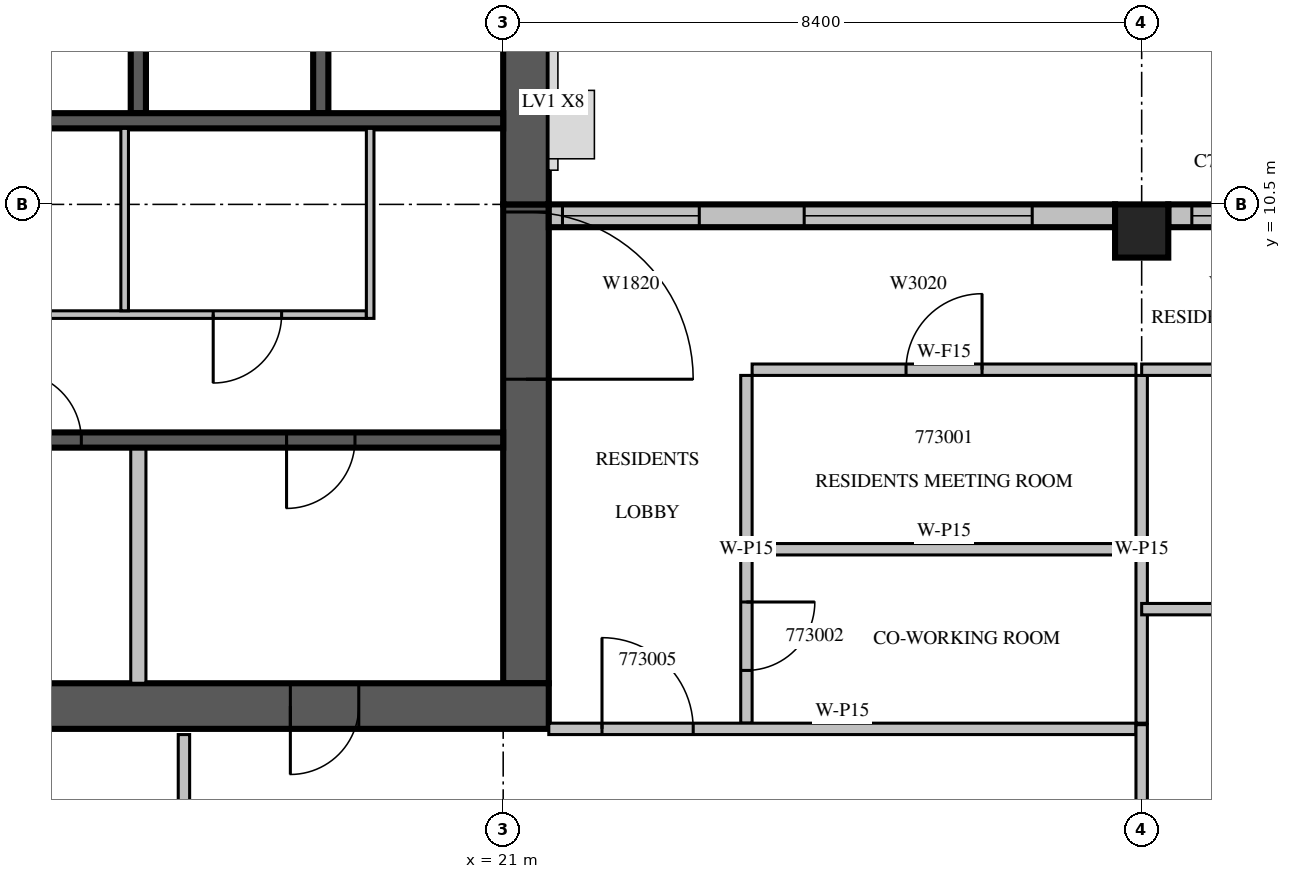
"""IFC4 building model, lengths in metres.
Left out: names, types, materials, properties, quantities, classifications, styles, units other than length and angle.
Written with IfcOpenShell. Run it as: python <this file> out.ifc"""

import sys

from ifc_helpers import new_model, si_unit, direction, frame, frame_2d, origin, origin_2d, place, context, subcontext, project, spatial, rectangle, extrude, source, transform, mapped, element, fill, save


model = new_model("IFC4")
c1 = context("Model", 3, precision=1e-05, world=origin(), true_north=direction((0.0, 1.0)))
c2 = subcontext(c1, "Body", "Model", "MODEL_VIEW")
j1 = project(units=[si_unit("LENGTHUNIT", "METRE"), si_unit("PLANEANGLEUNIT", "RADIAN")], contexts=[c1])
p1 = place(None, origin())
s1 = spatial("IfcSite", under=j1, at=p1, CompositionType="ELEMENT")
p2 = place(p1, origin())
s2 = spatial("IfcBuilding", under=s1, at=p2, CompositionType="ELEMENT")
p3 = place(p2, frame((0.0, 0.0, 316.0)))
s3 = spatial("IfcBuildingStorey", under=s2, at=p3, CompositionType="ELEMENT", Elevation=316.0)
m1 = source(origin(), c2, "Body", "SweptSolid", [
    extrude(rectangle(XDim=0.7, YDim=0.7, at=origin_2d()), origin(), (0.0, 0.0, 1.0), 3.5),
])
p4 = place(p3, frame((29.4, 10.15, 0.0), z_axis=(0.0, 0.0, 1.0), x_axis=(1.0, 0.0, 0.0)))
e1 = element("IfcColumn", 1, at=p4, inside=s3, PredefinedType="COLUMN", context=c2, shape_type="MappedRepresentation", body=[
    mapped(m1, transform((0.0, 0.0, 0.0), scale=1.0)),
])
m2 = source(origin(), c2, "Body", "SweptSolid", [
    extrude(rectangle(XDim=6.3, YDim=0.6, at=frame_2d((3.15, 0.0))), origin(), (0.0, 0.0, 1.0), 3.5),
])
p5 = place(p3, frame((21.3, 4.2, 0.0), z_axis=(0.0, 0.0, 1.0), x_axis=(0.0, 1.0, 0.0)))
e2 = element("IfcWall", 2, at=p5, inside=s3, PredefinedType="SHEAR", context=c2, shape_type="MappedRepresentation", body=[
    mapped(m2, transform((0.0, 0.0, 0.0), scale=1.0)),
])
m3 = source(origin(), c2, "Body", "SweptSolid", [
    extrude(rectangle(XDim=2.2, YDim=2.1, at=frame_2d((1.1, 1.05))), frame((0.0, 0.31, 0.0), z_axis=(0.0, -1.0, 0.0), x_axis=(1.0, 0.0, 0.0)), (0.0, 0.0, 1.0), 0.62),
])
p6 = place(p5, frame((4.0, 0.0, 0.0)))
e3 = element("IfcOpeningElement", 3, at=p6, cuts=e2, PredefinedType="OPENING", context=c2, shape_type="MappedRepresentation", body=[
    mapped(m3, transform((0.0, 0.0, 0.0), scale=1.0)),
])
m4 = source(origin(), c2, "Body", "SweptSolid", [
    extrude(rectangle(XDim=17.4, YDim=0.6, at=frame_2d((8.7, 0.0))), origin(), (0.0, 0.0, 1.0), 3.5),
])
p7 = place(p3, frame((4.2, 3.9, 0.0), z_axis=(0.0, 0.0, 1.0), x_axis=(1.0, 0.0, 0.0)))
e4 = element("IfcWall", 4, at=p7, inside=s3, PredefinedType="SHEAR", context=c2, shape_type="MappedRepresentation", body=[
    mapped(m4, transform((0.0, 0.0, 0.0), scale=1.0)),
])
m5 = source(origin(), c2, "Body", "SweptSolid", [
    extrude(rectangle(XDim=0.9, YDim=2.1, at=frame_2d((0.45, 1.05))), frame((0.0, 0.31, 0.0), z_axis=(0.0, -1.0, 0.0), x_axis=(1.0, 0.0, 0.0)), (0.0, 0.0, 1.0), 0.62),
])
p8 = place(p7, frame((14.0, 0.0, 0.0)))
e5 = element("IfcOpeningElement", 5, at=p8, cuts=e4, PredefinedType="OPENING", context=c2, shape_type="MappedRepresentation", body=[
    mapped(m5, transform((0.0, 0.0, 0.0), scale=1.0)),
])
m6 = source(origin(), c2, "Body", "SweptSolid", [
    extrude(rectangle(XDim=10.5, YDim=0.6, at=frame_2d((5.25, 0.0))), origin(), (0.0, 0.0, 1.0), 3.5),
])
p9 = place(p3, frame((21.3, 10.5, 0.0), z_axis=(0.0, 0.0, 1.0), x_axis=(0.0, 1.0, 0.0)))
e6 = element("IfcWall", 6, at=p9, inside=s3, PredefinedType="SHEAR", context=c2, shape_type="MappedRepresentation", body=[
    mapped(m6, transform((0.0, 0.0, 0.0), scale=1.0)),
])
m7 = source(origin(), c2, "Body", "SweptSolid", [
    extrude(rectangle(XDim=1.2, YDim=2.4, at=frame_2d((0.6, 1.2))), frame((0.0, 0.31, 0.0), z_axis=(0.0, -1.0, 0.0), x_axis=(1.0, 0.0, 0.0)), (0.0, 0.0, 1.0), 0.62),
])
p10 = place(p9, frame((5.7, 0.0, 0.6)))
e7 = element("IfcOpeningElement", 7, at=p10, cuts=e6, PredefinedType="OPENING", context=c2, shape_type="MappedRepresentation", body=[
    mapped(m7, transform((0.0, 0.0, 0.0), scale=1.0)),
])
m8 = source(origin(), c2, "Body", "SweptSolid", [
    extrude(rectangle(XDim=7.7, YDim=0.3, at=frame_2d((3.85, 0.0))), origin(), (0.0, 0.0, 1.0), 3.1),
])
p11 = place(p3, frame((37.45, 10.35, 0.0), z_axis=(0.0, 0.0, 1.0), x_axis=(-1.0, 0.0, 0.0)))
e8 = element("IfcWall", 8, at=p11, inside=s3, PredefinedType="STANDARD", context=c2, shape_type="MappedRepresentation", body=[
    mapped(m8, transform((0.0, 0.0, 0.0), scale=1.0)),
])
m9 = source(origin(), c2, "Body", "SweptSolid", [
    extrude(rectangle(XDim=3.0, YDim=2.0, at=frame_2d((1.5, 1.0))), frame((0.0, 0.16, 0.0), z_axis=(0.0, -1.0, 0.0), x_axis=(1.0, 0.0, 0.0)), (0.0, 0.0, 1.0), 0.32),
])
p12 = place(p11, frame((1.09, 0.0, 0.6)))
e9 = element("IfcOpeningElement", 9, at=p12, cuts=e8, PredefinedType="OPENING", context=c2, shape_type="MappedRepresentation", body=[
    mapped(m9, transform((0.0, 0.0, 0.0), scale=1.0)),
])
m10 = source(origin(), c2, "Body", "SweptSolid", [
    extrude(rectangle(XDim=1.2, YDim=2.0, at=frame_2d((0.6, 1.0))), frame((0.0, 0.16, 0.0), z_axis=(0.0, -1.0, 0.0), x_axis=(1.0, 0.0, 0.0)), (0.0, 0.0, 1.0), 0.32),
])
p13 = place(p11, frame((6.19, 0.0, 0.6)))
e10 = element("IfcOpeningElement", 10, at=p13, cuts=e8, PredefinedType="OPENING", context=c2, shape_type="MappedRepresentation", body=[
    mapped(m10, transform((0.0, 0.0, 0.0), scale=1.0)),
])
m11 = source(origin(), c2, "Body", "SweptSolid", [
    extrude(rectangle(XDim=7.45, YDim=0.3, at=frame_2d((3.725, 0.0))), origin(), (0.0, 0.0, 1.0), 3.1),
])
p14 = place(p3, frame((29.05, 10.35, 0.0), z_axis=(0.0, 0.0, 1.0), x_axis=(-1.0, 0.0, 0.0)))
e11 = element("IfcWall", 11, at=p14, inside=s3, PredefinedType="STANDARD", context=c2, shape_type="MappedRepresentation", body=[
    mapped(m11, transform((0.0, 0.0, 0.0), scale=1.0)),
])
p15 = place(p14, frame((1.09, 0.0, 0.6)))
e12 = element("IfcOpeningElement", 12, at=p15, cuts=e11, PredefinedType="OPENING", context=c2, shape_type="MappedRepresentation", body=[
    mapped(m9, transform((0.0, 0.0, 0.0), scale=1.0)),
])
m12 = source(origin(), c2, "Body", "SweptSolid", [
    extrude(rectangle(XDim=1.8, YDim=2.0, at=frame_2d((0.9, 1.0))), frame((0.0, 0.16, 0.0), z_axis=(0.0, -1.0, 0.0), x_axis=(1.0, 0.0, 0.0)), (0.0, 0.0, 1.0), 0.32),
])
p16 = place(p14, frame((5.47, 0.0, 0.6)))
e13 = element("IfcOpeningElement", 13, at=p16, cuts=e11, PredefinedType="OPENING", context=c2, shape_type="MappedRepresentation", body=[
    mapped(m12, transform((0.0, 0.0, 0.0), scale=1.0)),
])
m13 = source(origin(), c2, "Body", "SweptSolid", [
    extrude(rectangle(XDim=3.1, YDim=0.2, at=frame_2d((1.55, 0.0))), origin(), (0.0, 0.0, 1.0), 3.1),
])
p17 = place(p3, frame((16.2, 4.2, 0.0), z_axis=(0.0, 0.0, 1.0), x_axis=(0.0, 1.0, 0.0)))
e14 = element("IfcWall", 14, at=p17, inside=s3, PredefinedType="PARTITIONING", context=c2, shape_type="MappedRepresentation", body=[
    mapped(m13, transform((0.0, 0.0, 0.0), scale=1.0)),
])
m14 = source(origin(), c2, "Body", "SweptSolid", [
    extrude(rectangle(XDim=3.0, YDim=0.2, at=frame_2d((1.5, 0.0))), origin(), (0.0, 0.0, 1.0), 3.5),
])
for number, where, z_axis, x_axis in (
    (15, (16.2, 11.7, 0.0), (0.0, 0.0, 1.0), (0.0, 1.0, 0.0)),
    (16, (18.6, 11.7, 0.0), (0.0, 0.0, 1.0), (0.0, 1.0, 0.0)),
):
    element("IfcWall", number, at=place(p3, frame(where, z_axis=z_axis, x_axis=x_axis)), inside=s3, PredefinedType="SOLIDWALL", context=c2, shape_type="MappedRepresentation", body=[
        mapped(m14, transform((0.0, 0.0, 0.0), scale=1.0)),
    ])
m15 = source(origin(), c2, "Body", "SweptSolid", [
    extrude(rectangle(XDim=7.2, YDim=0.2, at=frame_2d((3.6, 0.0))), origin(), (0.0, 0.0, 1.0), 3.1),
])
p18 = place(p3, frame((13.8, 7.4, 0.0), z_axis=(0.0, 0.0, 1.0), x_axis=(1.0, 0.0, 0.0)))
e17 = element("IfcWall", 17, at=p18, inside=s3, PredefinedType="SOLIDWALL", context=c2, shape_type="MappedRepresentation", body=[
    mapped(m15, transform((0.0, 0.0, 0.0), scale=1.0)),
])
m16 = source(origin(), c2, "Body", "SweptSolid", [
    extrude(rectangle(XDim=0.9, YDim=2.1, at=frame_2d((0.45, 1.05))), frame((0.0, 0.11, 0.0), z_axis=(0.0, -1.0, 0.0), x_axis=(1.0, 0.0, 0.0)), (0.0, 0.0, 1.0), 0.22),
])
p19 = place(p18, frame((0.75, 0.0, 0.0)))
e18 = element("IfcOpeningElement", 18, at=p19, cuts=e17, PredefinedType="OPENING", context=c2, shape_type="MappedRepresentation", body=[
    mapped(m16, transform((0.0, 0.0, 0.0), scale=1.0)),
])
p20 = place(p18, frame((4.35, 0.0, 0.0)))
e19 = element("IfcOpeningElement", 19, at=p20, cuts=e17, PredefinedType="OPENING", context=c2, shape_type="MappedRepresentation", body=[
    mapped(m16, transform((0.0, 0.0, 0.0), scale=1.0)),
])
m17 = source(origin(), c2, "Body", "SweptSolid", [
    extrude(rectangle(XDim=7.2, YDim=0.2, at=frame_2d((3.6, 0.0))), origin(), (0.0, 0.0, 1.0), 3.5),
])
p21 = place(p3, frame((13.8, 11.6, 0.0), z_axis=(0.0, 0.0, 1.0), x_axis=(1.0, 0.0, 0.0)))
e20 = element("IfcWall", 20, at=p21, inside=s3, PredefinedType="SOLIDWALL", context=c2, shape_type="MappedRepresentation", body=[
    mapped(m17, transform((0.0, 0.0, 0.0), scale=1.0)),
])
m18 = source(origin(), c2, "Body", "SweptSolid", [
    extrude(rectangle(XDim=5.4, YDim=0.1, at=frame_2d((2.7, 0.0))), origin(), (0.0, 0.0, 1.0), 3.1),
])
p22 = place(p3, frame((13.8, 9.05, 0.0), z_axis=(0.0, 0.0, 1.0), x_axis=(1.0, 0.0, 0.0)))
e21 = element("IfcWall", 21, at=p22, inside=s3, PredefinedType="PARTITIONING", context=c2, shape_type="MappedRepresentation", body=[
    mapped(m18, transform((0.0, 0.0, 0.0), scale=1.0)),
])
m19 = source(origin(), c2, "Body", "SweptSolid", [
    extrude(rectangle(XDim=0.9, YDim=2.1, at=frame_2d((0.45, 1.05))), frame((0.0, 0.06, 0.0), z_axis=(0.0, -1.0, 0.0), x_axis=(1.0, 0.0, 0.0)), (0.0, 0.0, 1.0), 0.12),
])
p23 = place(p22, frame((3.385, 0.0, 0.0)))
e22 = element("IfcOpeningElement", 22, at=p23, cuts=e21, PredefinedType="OPENING", context=c2, shape_type="MappedRepresentation", body=[
    mapped(m19, transform((0.0, 0.0, 0.0), scale=1.0)),
])
m20 = source(origin(), c2, "Body", "SweptSolid", [
    extrude(rectangle(XDim=2.4, YDim=0.1, at=frame_2d((1.2, 0.0))), origin(), (0.0, 0.0, 1.0), 3.1),
])
p24 = place(p3, frame((16.02, 9.1, 0.0), z_axis=(0.0, 0.0, 1.0), x_axis=(0.0, 1.0, 0.0)))
e23 = element("IfcWall", 23, at=p24, inside=s3, PredefinedType="PARTITIONING", context=c2, shape_type="MappedRepresentation", body=[
    mapped(m20, transform((0.0, 0.0, 0.0), scale=1.0)),
])
m21 = source(origin(), c2, "Body", "SweptSolid", [
    extrude(rectangle(XDim=2.5, YDim=0.1, at=frame_2d((1.25, 0.0))), origin(), (0.0, 0.0, 1.0), 3.1),
])
p25 = place(p3, frame((19.25, 9.0, 0.0), z_axis=(0.0, 0.0, 1.0), x_axis=(0.0, 1.0, 0.0)))
e24 = element("IfcWall", 24, at=p25, inside=s3, PredefinedType="PARTITIONING", context=c2, shape_type="MappedRepresentation", body=[
    mapped(m21, transform((0.0, 0.0, 0.0), scale=1.0)),
])
m22 = source(origin(), c2, "Body", "SweptSolid", [
    extrude(rectangle(XDim=4.575, YDim=0.15, at=frame_2d((2.288, 0.0))), origin(), (0.0, 0.0, 1.0), 3.1),
])
p26 = place(p3, frame((24.2, 8.25, 0.0), z_axis=(0.0, 0.0, 1.0), x_axis=(0.0, -1.0, 0.0)))
e25 = element("IfcWall", 25, at=p26, inside=s3, PredefinedType="PARTITIONING", context=c2, shape_type="MappedRepresentation", body=[
    mapped(m22, transform((0.0, 0.0, 0.0), scale=1.0)),
])
m23 = source(origin(), c2, "Body", "SweptSolid", [
    extrude(rectangle(XDim=0.9, YDim=2.1, at=frame_2d((0.45, 1.05))), frame((0.0, 0.085, 0.0), z_axis=(0.0, -1.0, 0.0), x_axis=(1.0, 0.0, 0.0)), (0.0, 0.0, 1.0), 0.17),
])
p27 = place(p26, frame((2.981, 0.0, 0.0)))
e26 = element("IfcOpeningElement", 26, at=p27, cuts=e25, PredefinedType="OPENING", context=c2, shape_type="MappedRepresentation", body=[
    mapped(m23, transform((0.0, 0.0, 0.0), scale=1.0)),
])
p28 = place(p3, frame((29.4, 3.675, 0.0), z_axis=(0.0, 0.0, 1.0), x_axis=(0.0, 1.0, 0.0)))
e27 = element("IfcWall", 27, at=p28, inside=s3, PredefinedType="PARTITIONING", context=c2, shape_type="MappedRepresentation", body=[
    mapped(m22, transform((0.0, 0.0, 0.0), scale=1.0)),
])
p29 = place(p3, frame((29.325, 8.325, 0.0), z_axis=(0.0, 0.0, 1.0), x_axis=(-1.0, 0.0, 0.0)))
e28 = element("IfcWall", 28, at=p29, inside=s3, PredefinedType="PARTITIONING", context=c2, shape_type="SweptSolid", body=[
    extrude(rectangle(XDim=5.05, YDim=0.15, at=frame_2d((2.525, 0.0))), origin(), (0.0, 0.0, 1.0), 3.1),
])
m24 = source(origin(), c2, "Body", "SweptSolid", [
    extrude(rectangle(XDim=1.0, YDim=2.1, at=frame_2d((0.5, 1.05))), frame((0.0, 0.085, 0.0), z_axis=(0.0, -1.0, 0.0), x_axis=(1.0, 0.0, 0.0)), (0.0, 0.0, 1.0), 0.17),
])
p30 = place(p29, frame((2.025, 0.0, 0.0)))
e29 = element("IfcOpeningElement", 29, at=p30, cuts=e28, PredefinedType="OPENING", context=c2, shape_type="MappedRepresentation", body=[
    mapped(m24, transform((0.0, 0.0, 0.0), scale=1.0)),
])
m25 = source(origin(), c2, "Body", "SweptSolid", [
    extrude(rectangle(XDim=5.05, YDim=0.15, at=frame_2d((2.525, 0.0))), origin(), (0.0, 0.0, 1.0), 3.1),
])
p31 = place(p3, frame((29.325, 5.963, 0.0), z_axis=(0.0, 0.0, 1.0), x_axis=(-1.0, 0.0, 0.0)))
e30 = element("IfcWall", 30, at=p31, inside=s3, PredefinedType="PARTITIONING", context=c2, shape_type="MappedRepresentation", body=[
    mapped(m25, transform((0.0, 0.0, 0.0), scale=1.0)),
])
m26 = source(origin(), c2, "Body", "SweptSolid", [
    extrude(rectangle(XDim=3.225, YDim=0.15, at=frame_2d((1.613, 0.0))), origin(), (0.0, 0.0, 1.0), 3.1),
])
p32 = place(p3, frame((16.8, 3.525, 0.0), z_axis=(0.0, 0.0, 1.0), x_axis=(0.0, -1.0, 0.0)))
e31 = element("IfcWall", 31, at=p32, inside=s3, PredefinedType="PARTITIONING", context=c2, shape_type="MappedRepresentation", body=[
    mapped(m26, transform((0.0, 0.0, 0.0), scale=1.0)),
])
p33 = place(p32, frame((1.125, 0.0, 0.0)))
e32 = element("IfcOpeningElement", 32, at=p33, cuts=e31, PredefinedType="OPENING", context=c2, shape_type="MappedRepresentation", body=[
    mapped(m23, transform((0.0, 0.0, 0.0), scale=1.0)),
])
m27 = source(origin(), c2, "Body", "SweptSolid", [
    extrude(rectangle(XDim=7.725, YDim=0.15, at=frame_2d((3.862, 0.0))), origin(), (0.0, 0.0, 1.0), 3.1),
])
p34 = place(p3, frame((21.6, 3.6, 0.0), z_axis=(0.0, 0.0, 1.0), x_axis=(1.0, 0.0, 0.0)))
e33 = element("IfcWall", 33, at=p34, inside=s3, PredefinedType="PARTITIONING", context=c2, shape_type="MappedRepresentation", body=[
    mapped(m27, transform((0.0, 0.0, 0.0), scale=1.0)),
])
m28 = source(origin(), c2, "Body", "SweptSolid", [
    extrude(rectangle(XDim=1.2, YDim=2.1, at=frame_2d((0.6, 1.05))), frame((0.0, 0.085, 0.0), z_axis=(0.0, -1.0, 0.0), x_axis=(1.0, 0.0, 0.0)), (0.0, 0.0, 1.0), 0.17),
])
p35 = place(p34, frame((0.7, 0.0, 0.0)))
e34 = element("IfcOpeningElement", 34, at=p35, cuts=e33, PredefinedType="OPENING", context=c2, shape_type="MappedRepresentation", body=[
    mapped(m28, transform((0.0, 0.0, 0.0), scale=1.0)),
])
m29 = source(origin(), c2, "Body", "SweptSolid", [
    extrude(rectangle(XDim=2.956, YDim=0.15, at=frame_2d((1.478, 0.0))), origin(), (0.0, 0.0, 1.0), 3.1),
])
p36 = place(p3, frame((29.4, 0.699, 0.0), z_axis=(0.0, 0.0, 1.0), x_axis=(0.0, 1.0, 0.0)))
e35 = element("IfcWall", 35, at=p36, inside=s3, PredefinedType="PARTITIONING", context=c2, shape_type="MappedRepresentation", body=[
    mapped(m29, transform((0.0, 0.0, 0.0), scale=1.0)),
])
m30 = source(origin(), c2, "Body", "SweptSolid", [
    extrude(rectangle(XDim=8.4, YDim=0.15, at=frame_2d((4.2, 0.0))), origin(), (0.0, 0.0, 1.0), 3.1),
])
p37 = place(p3, frame((37.8, 5.175, 0.0), z_axis=(0.0, 0.0, 1.0), x_axis=(-1.0, 0.0, 0.0)))
e36 = element("IfcWall", 36, at=p37, inside=s3, PredefinedType="PARTITIONING", context=c2, shape_type="MappedRepresentation", body=[
    mapped(m30, transform((0.0, 0.0, 0.0), scale=1.0)),
])
p38 = place(p37, frame((5.648, 0.0, 0.0)))
e37 = element("IfcOpeningElement", 37, at=p38, cuts=e36, PredefinedType="OPENING", context=c2, shape_type="MappedRepresentation", body=[
    mapped(m28, transform((0.0, 0.0, 0.0), scale=1.0)),
])
p39 = place(p3, frame((37.8, 8.325, 0.0), z_axis=(0.0, 0.0, 1.0), x_axis=(-1.0, 0.0, 0.0)))
e38 = element("IfcWall", 38, at=p39, inside=s3, PredefinedType="PARTITIONING", context=c2, shape_type="MappedRepresentation", body=[
    mapped(m30, transform((0.0, 0.0, 0.0), scale=1.0)),
])
p40 = place(p39, frame((5.698, 0.0, 0.0)))
e39 = element("IfcOpeningElement", 39, at=p40, cuts=e38, PredefinedType="OPENING", context=c2, shape_type="MappedRepresentation", body=[
    mapped(m28, transform((0.0, 0.0, 0.0), scale=1.0)),
])
p41 = place(p39, frame((2.773, 0.0, 0.0)))
e40 = element("IfcOpeningElement", 40, at=p41, cuts=e38, PredefinedType="OPENING", context=c2, shape_type="MappedRepresentation", body=[
    mapped(m23, transform((0.0, 0.0, 0.0), scale=1.0)),
])
p42 = place(p39, frame((0.676, 0.0, 0.0)))
e41 = element("IfcOpeningElement", 41, at=p42, cuts=e38, PredefinedType="OPENING", context=c2, shape_type="MappedRepresentation", body=[
    mapped(m23, transform((0.0, 0.0, 0.0), scale=1.0)),
])
m31 = source(origin(), c2, "Body", "SweptSolid", [
    extrude(rectangle(XDim=1.2, YDim=2.0, at=frame_2d((0.6, 1.0))), frame((0.0, 0.03, 0.0), z_axis=(0.0, -1.0, 0.0), x_axis=(1.0, 0.0, 0.0)), (0.0, 0.0, 1.0), 0.06),
])
p43 = place(p13, origin())
e42 = element("IfcWindow", 42, at=p43, inside=s3, PartitioningType="SINGLE_PANEL", PredefinedType="WINDOW", context=c2, shape_type="MappedRepresentation", body=[
    mapped(m31, transform((0.0, 0.0, 0.0), scale=1.0)),
])
fill(e10, e42)
m32 = source(origin(), c2, "Body", "SweptSolid", [
    extrude(rectangle(XDim=3.0, YDim=2.0, at=frame_2d((1.5, 1.0))), frame((0.0, 0.03, 0.0), z_axis=(0.0, -1.0, 0.0), x_axis=(1.0, 0.0, 0.0)), (0.0, 0.0, 1.0), 0.06),
])
p44 = place(p15, origin())
e43 = element("IfcWindow", 43, at=p44, inside=s3, PartitioningType="SINGLE_PANEL", PredefinedType="WINDOW", context=c2, shape_type="MappedRepresentation", body=[
    mapped(m32, transform((0.0, 0.0, 0.0), scale=1.0)),
])
fill(e12, e43)
m33 = source(origin(), c2, "Body", "SweptSolid", [
    extrude(rectangle(XDim=1.8, YDim=2.0, at=frame_2d((0.9, 1.0))), frame((0.0, 0.03, 0.0), z_axis=(0.0, -1.0, 0.0), x_axis=(1.0, 0.0, 0.0)), (0.0, 0.0, 1.0), 0.06),
])
p45 = place(p16, origin())
e44 = element("IfcWindow", 44, at=p45, inside=s3, PartitioningType="SINGLE_PANEL", PredefinedType="WINDOW", context=c2, shape_type="MappedRepresentation", body=[
    mapped(m33, transform((0.0, 0.0, 0.0), scale=1.0)),
])
fill(e13, e44)
m34 = source(origin(), c2, "Body", "SweptSolid", [
    extrude(rectangle(XDim=0.9, YDim=2.1, at=frame_2d((0.45, 1.05))), frame((0.0, 0.025, 0.0), z_axis=(0.0, -1.0, 0.0), x_axis=(1.0, 0.0, 0.0)), (0.0, 0.0, 1.0), 0.05),
])
p46 = place(p19, origin())
e45 = element("IfcDoor", 45, at=p46, inside=s3, OperationType="SINGLE_SWING_LEFT", PredefinedType="DOOR", context=c2, shape_type="MappedRepresentation", body=[
    mapped(m34, transform((0.0, 0.0, 0.0), scale=1.0)),
])
fill(e18, e45)
p47 = place(p20, origin())
e46 = element("IfcDoor", 46, at=p47, inside=s3, OperationType="SINGLE_SWING_RIGHT", PredefinedType="DOOR", context=c2, shape_type="MappedRepresentation", body=[
    mapped(m34, transform((0.0, 0.0, 0.0), scale=1.0)),
])
fill(e19, e46)
p48 = place(p23, origin())
e47 = element("IfcDoor", 47, at=p48, inside=s3, OperationType="SINGLE_SWING_RIGHT", PredefinedType="DOOR", context=c2, shape_type="MappedRepresentation", body=[
    mapped(m34, transform((0.0, 0.0, 0.0), scale=1.0)),
])
fill(e22, e47)
m35 = source(origin(), c2, "Body", "SweptSolid", [
    extrude(rectangle(XDim=2.2, YDim=2.1, at=frame_2d((1.1, 1.05))), frame((0.0, 0.025, 0.0), z_axis=(0.0, -1.0, 0.0), x_axis=(1.0, 0.0, 0.0)), (0.0, 0.0, 1.0), 0.05),
])
p49 = place(p6, origin())
e48 = element("IfcDoor", 48, at=p49, inside=s3, OperationType="DOUBLE_DOOR_SINGLE_SWING", PredefinedType="DOOR", context=c2, shape_type="MappedRepresentation", body=[
    mapped(m35, transform((0.0, 0.0, 0.0), scale=1.0)),
])
fill(e3, e48)
p50 = place(p8, origin())
e49 = element("IfcDoor", 49, at=p50, inside=s3, OperationType="SINGLE_SWING_RIGHT", PredefinedType="DOOR", context=c2, shape_type="MappedRepresentation", body=[
    mapped(m34, transform((0.0, 0.0, 0.0), scale=1.0)),
])
fill(e5, e49)
m36 = source(origin(), c2, "Body", "SweptSolid", [
    extrude(rectangle(XDim=1.0, YDim=2.1, at=frame_2d((0.5, 1.05))), frame((0.0, 0.025, 0.0), z_axis=(0.0, -1.0, 0.0), x_axis=(1.0, 0.0, 0.0)), (0.0, 0.0, 1.0), 0.05),
])
p51 = place(p30, origin())
e50 = element("IfcDoor", 50, at=p51, inside=s3, OperationType="SINGLE_SWING_RIGHT", PredefinedType="DOOR", context=c2, shape_type="MappedRepresentation", body=[
    mapped(m36, transform((0.0, 0.0, 0.0), scale=1.0)),
])
fill(e29, e50)
p52 = place(p27, origin())
e51 = element("IfcDoor", 51, at=p52, inside=s3, OperationType="SINGLE_SWING_LEFT", PredefinedType="DOOR", context=c2, shape_type="MappedRepresentation", body=[
    mapped(m34, transform((0.0, 0.0, 0.0), scale=1.0)),
])
fill(e26, e51)
m37 = source(origin(), c2, "Body", "SweptSolid", [
    extrude(rectangle(XDim=1.2, YDim=2.1, at=frame_2d((0.6, 1.05))), frame((0.0, 0.025, 0.0), z_axis=(0.0, -1.0, 0.0), x_axis=(1.0, 0.0, 0.0)), (0.0, 0.0, 1.0), 0.05),
])
p53 = place(p35, origin())
e52 = element("IfcDoor", 52, at=p53, inside=s3, OperationType="SINGLE_SWING_LEFT", PredefinedType="DOOR", context=c2, shape_type="MappedRepresentation", body=[
    mapped(m37, transform((0.0, 0.0, 0.0), scale=1.0)),
])
fill(e34, e52)
save(model, sys.argv[1])
